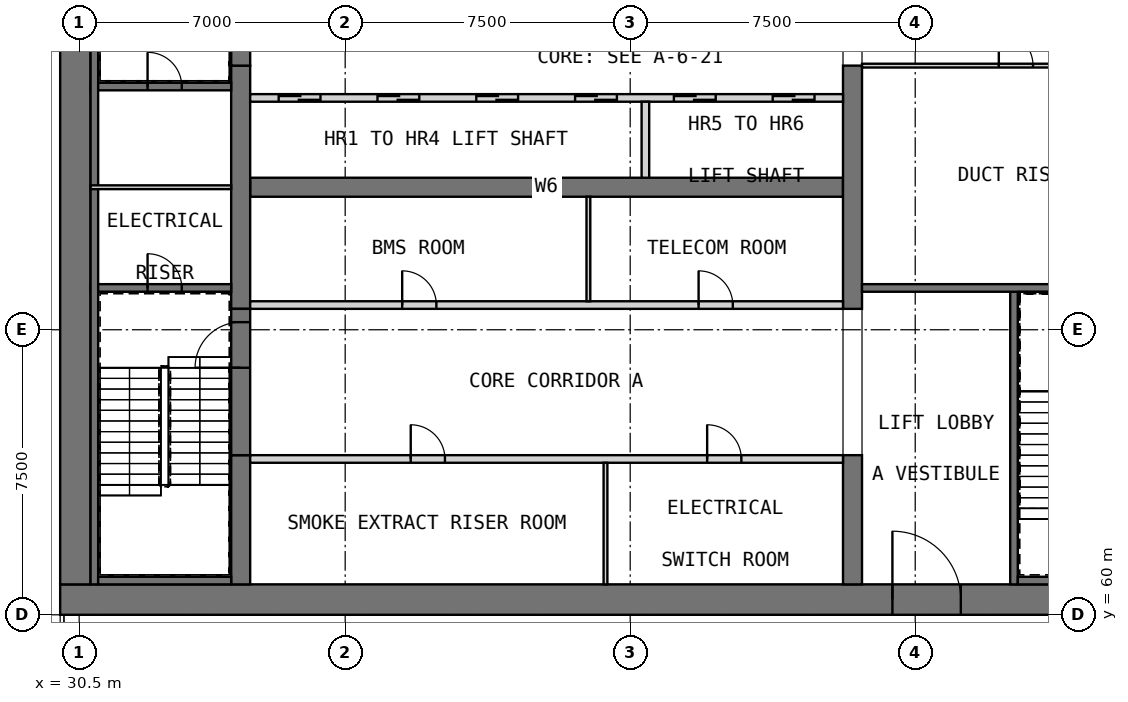
"""IFC4 building model, lengths in metres.
Left out: names, types, materials, properties, quantities, classifications, styles, units other than length and angle.
Written with IfcOpenShell. Run it as: python <this file> out.ifc"""

import sys

from ifc_helpers import new_model, si_unit, direction, frame, frame_2d, origin, place, context, subcontext, project, spatial, rectangle, extrude, element, fill, save


model = new_model("IFC4")
c1 = context("Model", 3, precision=1e-05, world=origin(), true_north=direction((0.0, 1.0)))
c2 = subcontext(c1, "Body", "Model", "MODEL_VIEW")
j1 = project(units=[si_unit("LENGTHUNIT", "METRE"), si_unit("PLANEANGLEUNIT", "RADIAN")], contexts=[c1])
p1 = place(None, origin())
s1 = spatial("IfcSite", under=j1, at=p1, CompositionType="ELEMENT")
p2 = place(p1, origin())
s2 = spatial("IfcBuilding", under=s1, at=p2, CompositionType="ELEMENT")
p3 = place(p2, frame((0.0, 0.0, 166.2)))
s3 = spatial("IfcBuildingStorey", under=s2, at=p3, CompositionType="ELEMENT", Elevation=166.2)
p4 = place(p3, frame((30.0, 60.4, 0.0), z_axis=(0.0, 0.0, 1.0), x_axis=(1.0, 0.0, 0.0)))
e1 = element("IfcWall", 1, at=p4, inside=s3, PredefinedType="SHEAR", context=c2, shape_type="SweptSolid", body=[
    extrude(rectangle(XDim=30.0, YDim=0.8, at=frame_2d((15.0, 0.0))), origin(), (0.0, 0.0, 1.0), 8.0),
])
p5 = place(p4, frame((21.9, 0.0, 0.0)))
e2 = element("IfcOpeningElement", 2, at=p5, cuts=e1, PredefinedType="OPENING", context=c2, shape_type="SweptSolid", body=[
    extrude(rectangle(XDim=1.8, YDim=2.1, at=frame_2d((0.9, 1.05))), frame((0.0, 0.41, 0.0), z_axis=(0.0, -1.0, 0.0), x_axis=(1.0, 0.0, 0.0)), (0.0, 0.0, 1.0), 0.82),
])
p6 = place(p4, frame((26.5, 0.0, 0.0)))
e3 = element("IfcOpeningElement", 3, at=p6, cuts=e1, PredefinedType="OPENING", context=c2, shape_type="SweptSolid", body=[
    extrude(rectangle(XDim=1.2, YDim=2.1, at=frame_2d((0.6, 1.05))), frame((0.0, 0.41, 0.0), z_axis=(0.0, -1.0, 0.0), x_axis=(1.0, 0.0, 0.0)), (0.0, 0.0, 1.0), 0.82),
])
p7 = place(p3, frame((30.4, 60.8, 0.0), z_axis=(0.0, 0.0, 1.0), x_axis=(0.0, 1.0, 0.0)))
e4 = element("IfcWall", 4, at=p7, inside=s3, PredefinedType="SHEAR", context=c2, shape_type="SweptSolid", body=[
    extrude(rectangle(XDim=20.9, YDim=0.8, at=frame_2d((10.45, 0.0))), origin(), (0.0, 0.0, 1.0), 8.0),
])
p8 = place(p3, frame((35.0, 71.25, 0.0), z_axis=(0.0, 0.0, 1.0), x_axis=(1.0, 0.0, 0.0)))
e5 = element("IfcWall", 5, at=p8, inside=s3, PredefinedType="SHEAR", context=c2, shape_type="SweptSolid", body=[
    extrude(rectangle(XDim=15.6, YDim=0.5, at=frame_2d((7.8, 0.0))), origin(), (0.0, 0.0, 1.0), 8.0),
])
p9 = place(p3, frame((34.75, 60.8, 0.0), z_axis=(0.0, 0.0, 1.0), x_axis=(0.0, 1.0, 0.0)))
e6 = element("IfcWall", 6, at=p9, inside=s3, PredefinedType="SHEAR", context=c2, shape_type="SweptSolid", body=[
    extrude(rectangle(XDim=3.4, YDim=0.5, at=frame_2d((1.7, 0.0))), origin(), (0.0, 0.0, 1.0), 8.0),
])
p10 = place(p3, frame((34.75, 68.05, 0.0), z_axis=(0.0, 0.0, 1.0), x_axis=(0.0, 1.0, 0.0)))
e7 = element("IfcWall", 7, at=p10, inside=s3, PredefinedType="SHEAR", context=c2, shape_type="SweptSolid", body=[
    extrude(rectangle(XDim=6.4, YDim=0.5, at=frame_2d((3.2, 0.0))), origin(), (0.0, 0.0, 1.0), 8.0),
])
p11 = place(p3, frame((50.85, 60.8, 0.0), z_axis=(0.0, 0.0, 1.0), x_axis=(0.0, 1.0, 0.0)))
e8 = element("IfcWall", 8, at=p11, inside=s3, PredefinedType="SHEAR", context=c2, shape_type="SweptSolid", body=[
    extrude(rectangle(XDim=3.4, YDim=0.5, at=frame_2d((1.7, 0.0))), origin(), (0.0, 0.0, 1.0), 8.0),
])
p12 = place(p3, frame((50.85, 68.05, 0.0), z_axis=(0.0, 0.0, 1.0), x_axis=(0.0, 1.0, 0.0)))
e9 = element("IfcWall", 9, at=p12, inside=s3, PredefinedType="SHEAR", context=c2, shape_type="SweptSolid", body=[
    extrude(rectangle(XDim=6.4, YDim=0.5, at=frame_2d((3.2, 0.0))), origin(), (0.0, 0.0, 1.0), 8.0),
])
p13 = place(p2, frame((0.0, 0.0, 34.0)))
s4 = spatial("IfcBuildingStorey", under=s2, at=p13, CompositionType="ELEMENT", Elevation=34.0)
for number, where, z_axis, x_axis in (
    (10, (29.7, 61.05, 0.0), (0.0, 0.0, 1.0), (0.0, 1.0, 0.0)),
    (11, (29.7, 65.925, 0.0), (0.0, 0.0, 1.0), (0.0, 1.0, 0.0)),
    (12, (29.7, 70.8, 0.0), (0.0, 0.0, 1.0), (0.0, 1.0, 0.0)),
):
    element("IfcWall", number, at=place(p13, frame(where, z_axis=z_axis, x_axis=x_axis)), inside=s4, PredefinedType="SOLIDWALL", context=c2, shape_type="SweptSolid", body=[
        extrude(rectangle(XDim=0.9, YDim=0.6, at=frame_2d((0.45, 0.0))), origin(), (0.0, 0.0, 1.0), 286.2),
    ])
p14 = place(p3, frame((35.0, 64.1, 0.0), z_axis=(0.0, 0.0, 1.0), x_axis=(1.0, 0.0, 0.0)))
e13 = element("IfcWall", 13, at=p14, inside=s3, PredefinedType="PARTITIONING", context=c2, shape_type="SweptSolid", body=[
    extrude(rectangle(XDim=15.6, YDim=0.2, at=frame_2d((7.8, 0.0))), origin(), (0.0, 0.0, 1.0), 7.7),
])
p15 = place(p14, frame((4.225, 0.0, 0.0)))
e14 = element("IfcOpeningElement", 14, at=p15, cuts=e13, PredefinedType="OPENING", context=c2, shape_type="SweptSolid", body=[
    extrude(rectangle(XDim=0.9, YDim=2.1, at=frame_2d((0.45, 1.05))), frame((0.0, 0.11, 0.0), z_axis=(0.0, -1.0, 0.0), x_axis=(1.0, 0.0, 0.0)), (0.0, 0.0, 1.0), 0.22),
])
p16 = place(p14, frame((12.025, 0.0, 0.0)))
e15 = element("IfcOpeningElement", 15, at=p16, cuts=e13, PredefinedType="OPENING", context=c2, shape_type="SweptSolid", body=[
    extrude(rectangle(XDim=0.9, YDim=2.1, at=frame_2d((0.45, 1.05))), frame((0.0, 0.11, 0.0), z_axis=(0.0, -1.0, 0.0), x_axis=(1.0, 0.0, 0.0)), (0.0, 0.0, 1.0), 0.22),
])
p17 = place(p3, frame((44.35, 60.8, 0.0), z_axis=(0.0, 0.0, 1.0), x_axis=(0.0, 1.0, 0.0)))
e16 = element("IfcWall", 16, at=p17, inside=s3, PredefinedType="PARTITIONING", context=c2, shape_type="SweptSolid", body=[
    extrude(rectangle(XDim=3.2, YDim=0.1, at=frame_2d((1.6, 0.0))), origin(), (0.0, 0.0, 1.0), 7.7),
])
p18 = place(p3, frame((35.0, 68.15, 0.0), z_axis=(0.0, 0.0, 1.0), x_axis=(1.0, 0.0, 0.0)))
e17 = element("IfcWall", 17, at=p18, inside=s3, PredefinedType="PARTITIONING", context=c2, shape_type="SweptSolid", body=[
    extrude(rectangle(XDim=15.6, YDim=0.2, at=frame_2d((7.8, 0.0))), origin(), (0.0, 0.0, 1.0), 7.7),
])
p19 = place(p18, frame((4.0, 0.0, 0.0)))
e18 = element("IfcOpeningElement", 18, at=p19, cuts=e17, PredefinedType="OPENING", context=c2, shape_type="SweptSolid", body=[
    extrude(rectangle(XDim=0.9, YDim=2.1, at=frame_2d((0.45, 1.05))), frame((0.0, 0.11, 0.0), z_axis=(0.0, -1.0, 0.0), x_axis=(1.0, 0.0, 0.0)), (0.0, 0.0, 1.0), 0.22),
])
p20 = place(p18, frame((11.8, 0.0, 0.0)))
e19 = element("IfcOpeningElement", 19, at=p20, cuts=e17, PredefinedType="OPENING", context=c2, shape_type="SweptSolid", body=[
    extrude(rectangle(XDim=0.9, YDim=2.1, at=frame_2d((0.45, 1.05))), frame((0.0, 0.11, 0.0), z_axis=(0.0, -1.0, 0.0), x_axis=(1.0, 0.0, 0.0)), (0.0, 0.0, 1.0), 0.22),
])
p21 = place(p3, frame((43.9, 68.25, 0.0), z_axis=(0.0, 0.0, 1.0), x_axis=(0.0, 1.0, 0.0)))
e20 = element("IfcWall", 20, at=p21, inside=s3, PredefinedType="PARTITIONING", context=c2, shape_type="SweptSolid", body=[
    extrude(rectangle(XDim=2.75, YDim=0.1, at=frame_2d((1.375, 0.0))), origin(), (0.0, 0.0, 1.0), 7.7),
])
p22 = place(p3, frame((35.0, 73.6, 0.0), z_axis=(0.0, 0.0, 1.0), x_axis=(1.0, 0.0, 0.0)))
e21 = element("IfcWall", 21, at=p22, inside=s3, PredefinedType="SOLIDWALL", context=c2, shape_type="SweptSolid", body=[
    extrude(rectangle(XDim=15.6, YDim=0.2, at=frame_2d((7.8, 0.0))), origin(), (0.0, 0.0, 1.0), 8.0),
])
p23 = place(p22, frame((0.75, 0.0, 0.0)))
e22 = element("IfcOpeningElement", 22, at=p23, cuts=e21, PredefinedType="OPENING", context=c2, shape_type="SweptSolid", body=[
    extrude(rectangle(XDim=1.1, YDim=2.1, at=frame_2d((0.55, 1.05))), frame((0.0, 0.11, 0.0), z_axis=(0.0, -1.0, 0.0), x_axis=(1.0, 0.0, 0.0)), (0.0, 0.0, 1.0), 0.22),
])
p24 = place(p22, frame((3.35, 0.0, 0.0)))
e23 = element("IfcOpeningElement", 23, at=p24, cuts=e21, PredefinedType="OPENING", context=c2, shape_type="SweptSolid", body=[
    extrude(rectangle(XDim=1.1, YDim=2.1, at=frame_2d((0.55, 1.05))), frame((0.0, 0.11, 0.0), z_axis=(0.0, -1.0, 0.0), x_axis=(1.0, 0.0, 0.0)), (0.0, 0.0, 1.0), 0.22),
])
p25 = place(p22, frame((5.95, 0.0, 0.0)))
e24 = element("IfcOpeningElement", 24, at=p25, cuts=e21, PredefinedType="OPENING", context=c2, shape_type="SweptSolid", body=[
    extrude(rectangle(XDim=1.1, YDim=2.1, at=frame_2d((0.55, 1.05))), frame((0.0, 0.11, 0.0), z_axis=(0.0, -1.0, 0.0), x_axis=(1.0, 0.0, 0.0)), (0.0, 0.0, 1.0), 0.22),
])
p26 = place(p22, frame((8.55, 0.0, 0.0)))
e25 = element("IfcOpeningElement", 25, at=p26, cuts=e21, PredefinedType="OPENING", context=c2, shape_type="SweptSolid", body=[
    extrude(rectangle(XDim=1.1, YDim=2.1, at=frame_2d((0.55, 1.05))), frame((0.0, 0.11, 0.0), z_axis=(0.0, -1.0, 0.0), x_axis=(1.0, 0.0, 0.0)), (0.0, 0.0, 1.0), 0.22),
])
p27 = place(p22, frame((11.15, 0.0, 0.0)))
e26 = element("IfcOpeningElement", 26, at=p27, cuts=e21, PredefinedType="OPENING", context=c2, shape_type="SweptSolid", body=[
    extrude(rectangle(XDim=1.1, YDim=2.1, at=frame_2d((0.55, 1.05))), frame((0.0, 0.11, 0.0), z_axis=(0.0, -1.0, 0.0), x_axis=(1.0, 0.0, 0.0)), (0.0, 0.0, 1.0), 0.22),
])
p28 = place(p22, frame((13.75, 0.0, 0.0)))
e27 = element("IfcOpeningElement", 27, at=p28, cuts=e21, PredefinedType="OPENING", context=c2, shape_type="SweptSolid", body=[
    extrude(rectangle(XDim=1.1, YDim=2.1, at=frame_2d((0.55, 1.05))), frame((0.0, 0.11, 0.0), z_axis=(0.0, -1.0, 0.0), x_axis=(1.0, 0.0, 0.0)), (0.0, 0.0, 1.0), 0.22),
])
p29 = place(p3, frame((45.4, 71.5, 0.0), z_axis=(0.0, 0.0, 1.0), x_axis=(0.0, 1.0, 0.0)))
e28 = element("IfcWall", 28, at=p29, inside=s3, PredefinedType="SOLIDWALL", context=c2, shape_type="SweptSolid", body=[
    extrude(rectangle(XDim=2.0, YDim=0.2, at=frame_2d((1.0, 0.0))), origin(), (0.0, 0.0, 1.0), 8.0),
])
p30 = place(p3, frame((34.75, 64.2, 0.0), z_axis=(0.0, 0.0, 1.0), x_axis=(0.0, 1.0, 0.0)))
e29 = element("IfcWall", 29, at=p30, inside=s3, PredefinedType="SOLIDWALL", context=c2, shape_type="SweptSolid", body=[
    extrude(rectangle(XDim=3.85, YDim=0.5, at=frame_2d((1.925, 0.0))), origin(), (0.0, 0.0, 1.0), 6.8),
])
p31 = place(p30, frame((2.3, 0.0, 0.0)))
e30 = element("IfcOpeningElement", 30, at=p31, cuts=e29, PredefinedType="OPENING", context=c2, shape_type="SweptSolid", body=[
    extrude(rectangle(XDim=1.2, YDim=2.1, at=frame_2d((0.6, 1.05))), frame((0.0, 0.26, 0.0), z_axis=(0.0, -1.0, 0.0), x_axis=(1.0, 0.0, 0.0)), (0.0, 0.0, 1.0), 0.52),
])
p32 = place(p3, frame((34.75, 74.45, 0.0), z_axis=(0.0, 0.0, 1.0), x_axis=(0.0, 1.0, 0.0)))
e31 = element("IfcWall", 31, at=p32, inside=s3, PredefinedType="SOLIDWALL", context=c2, shape_type="SweptSolid", body=[
    extrude(rectangle(XDim=3.85, YDim=0.5, at=frame_2d((1.925, 0.0))), origin(), (0.0, 0.0, 1.0), 6.8),
])
p33 = place(p32, frame((1.0, 0.0, 0.0)))
e32 = element("IfcOpeningElement", 32, at=p33, cuts=e31, PredefinedType="OPENING", context=c2, shape_type="SweptSolid", body=[
    extrude(rectangle(XDim=1.2, YDim=2.1, at=frame_2d((0.6, 1.05))), frame((0.0, 0.26, 0.0), z_axis=(0.0, -1.0, 0.0), x_axis=(1.0, 0.0, 0.0)), (0.0, 0.0, 1.0), 0.52),
])
p34 = place(p3, frame((30.8, 68.6, 0.0), z_axis=(0.0, 0.0, 1.0), x_axis=(1.0, 0.0, 0.0)))
e33 = element("IfcWall", 33, at=p34, inside=s3, PredefinedType="SOLIDWALL", context=c2, shape_type="SweptSolid", body=[
    extrude(rectangle(XDim=3.7, YDim=0.2, at=frame_2d((1.85, 0.0))), origin(), (0.0, 0.0, 1.0), 7.7),
])
p35 = place(p34, frame((1.5, 0.0, 0.0)))
e34 = element("IfcOpeningElement", 34, at=p35, cuts=e33, PredefinedType="OPENING", context=c2, shape_type="SweptSolid", body=[
    extrude(rectangle(XDim=0.9, YDim=2.1, at=frame_2d((0.45, 1.05))), frame((0.0, 0.11, 0.0), z_axis=(0.0, -1.0, 0.0), x_axis=(1.0, 0.0, 0.0)), (0.0, 0.0, 1.0), 0.22),
])
p36 = place(p3, frame((30.8, 73.9, 0.0), z_axis=(0.0, 0.0, 1.0), x_axis=(1.0, 0.0, 0.0)))
e35 = element("IfcWall", 35, at=p36, inside=s3, PredefinedType="SOLIDWALL", context=c2, shape_type="SweptSolid", body=[
    extrude(rectangle(XDim=3.7, YDim=0.2, at=frame_2d((1.85, 0.0))), origin(), (0.0, 0.0, 1.0), 7.7),
])
p37 = place(p36, frame((1.5, 0.0, 0.0)))
e36 = element("IfcOpeningElement", 36, at=p37, cuts=e35, PredefinedType="OPENING", context=c2, shape_type="SweptSolid", body=[
    extrude(rectangle(XDim=0.9, YDim=2.1, at=frame_2d((0.45, 1.05))), frame((0.0, 0.11, 0.0), z_axis=(0.0, -1.0, 0.0), x_axis=(1.0, 0.0, 0.0)), (0.0, 0.0, 1.0), 0.22),
])
p38 = place(p3, frame((55.1, 60.8, 0.0), z_axis=(0.0, 0.0, 1.0), x_axis=(0.0, 1.0, 0.0)))
e37 = element("IfcWall", 37, at=p38, inside=s3, PredefinedType="SOLIDWALL", context=c2, shape_type="SweptSolid", body=[
    extrude(rectangle(XDim=7.8, YDim=0.2, at=frame_2d((3.9, 0.0))), origin(), (0.0, 0.0, 1.0), 7.7),
])
p39 = place(p3, frame((51.1, 68.6, 0.0), z_axis=(0.0, 0.0, 1.0), x_axis=(1.0, 0.0, 0.0)))
e38 = element("IfcWall", 38, at=p39, inside=s3, PredefinedType="SOLIDWALL", context=c2, shape_type="SweptSolid", body=[
    extrude(rectangle(XDim=8.1, YDim=0.2, at=frame_2d((4.05, 0.0))), origin(), (0.0, 0.0, 1.0), 7.7),
])
p40 = place(p3, frame((30.9, 60.8, 0.0), z_axis=(0.0, 0.0, 1.0), x_axis=(0.0, 1.0, 0.0)))
e39 = element("IfcWall", 39, at=p40, inside=s3, PredefinedType="SOLIDWALL", context=c2, shape_type="SweptSolid", body=[
    extrude(rectangle(XDim=20.9, YDim=0.2, at=frame_2d((10.45, 0.0))), origin(), (0.0, 0.0, 1.0), 7.7),
])
p41 = place(p3, frame((31.0, 60.9, 0.0), z_axis=(0.0, 0.0, 1.0), x_axis=(1.0, 0.0, 0.0)))
e40 = element("IfcWall", 40, at=p41, inside=s3, PredefinedType="SOLIDWALL", context=c2, shape_type="SweptSolid", body=[
    extrude(rectangle(XDim=3.5, YDim=0.2, at=frame_2d((1.75, 0.0))), origin(), (0.0, 0.0, 1.0), 7.7),
])
p42 = place(p3, frame((55.2, 60.9, 0.0), z_axis=(0.0, 0.0, 1.0), x_axis=(1.0, 0.0, 0.0)))
e41 = element("IfcWall", 41, at=p42, inside=s3, PredefinedType="SOLIDWALL", context=c2, shape_type="SweptSolid", body=[
    extrude(rectangle(XDim=1.3, YDim=0.2, at=frame_2d((0.65, 0.0))), origin(), (0.0, 0.0, 1.0), 7.7),
])
p43 = place(p3, frame((30.8, 71.25, 0.0), z_axis=(0.0, 0.0, 1.0), x_axis=(1.0, 0.0, 0.0)))
e42 = element("IfcWall", 42, at=p43, inside=s3, PredefinedType="PARTITIONING", context=c2, shape_type="SweptSolid", body=[
    extrude(rectangle(XDim=3.7, YDim=0.1, at=frame_2d((1.85, 0.0))), origin(), (0.0, 0.0, 1.0), 7.7),
])
p44 = place(p3, frame((51.1, 74.45, 0.0), z_axis=(0.0, 0.0, 1.0), x_axis=(1.0, 0.0, 0.0)))
e43 = element("IfcWall", 43, at=p44, inside=s3, PredefinedType="PARTITIONING", context=c2, shape_type="SweptSolid", body=[
    extrude(rectangle(XDim=8.1, YDim=0.1, at=frame_2d((4.05, 0.0))), origin(), (0.0, 0.0, 1.0), 7.7),
])
p45 = place(p44, frame((3.6, 0.0, 0.0)))
e44 = element("IfcOpeningElement", 44, at=p45, cuts=e43, PredefinedType="OPENING", context=c2, shape_type="SweptSolid", body=[
    extrude(rectangle(XDim=0.9, YDim=2.1, at=frame_2d((0.45, 1.05))), frame((0.0, 0.06, 0.0), z_axis=(0.0, -1.0, 0.0), x_axis=(1.0, 0.0, 0.0)), (0.0, 0.0, 1.0), 0.12),
])
p46 = place(p15, origin())
e45 = element("IfcDoor", 45, at=p46, inside=s3, OperationType="SINGLE_SWING_LEFT", PredefinedType="DOOR", context=c2, shape_type="SweptSolid", body=[
    extrude(rectangle(XDim=0.9, YDim=2.1, at=frame_2d((0.45, 1.05))), frame((0.0, 0.025, 0.0), z_axis=(0.0, -1.0, 0.0), x_axis=(1.0, 0.0, 0.0)), (0.0, 0.0, 1.0), 0.05),
])
fill(e14, e45)
p47 = place(p16, origin())
e46 = element("IfcDoor", 46, at=p47, inside=s3, OperationType="SINGLE_SWING_RIGHT", PredefinedType="DOOR", context=c2, shape_type="SweptSolid", body=[
    extrude(rectangle(XDim=0.9, YDim=2.1, at=frame_2d((0.45, 1.05))), frame((0.0, 0.025, 0.0), z_axis=(0.0, -1.0, 0.0), x_axis=(1.0, 0.0, 0.0)), (0.0, 0.0, 1.0), 0.05),
])
fill(e15, e46)
p48 = place(p19, origin())
e47 = element("IfcDoor", 47, at=p48, inside=s3, OperationType="SINGLE_SWING_LEFT", PredefinedType="DOOR", context=c2, shape_type="SweptSolid", body=[
    extrude(rectangle(XDim=0.9, YDim=2.1, at=frame_2d((0.45, 1.05))), frame((0.0, 0.025, 0.0), z_axis=(0.0, -1.0, 0.0), x_axis=(1.0, 0.0, 0.0)), (0.0, 0.0, 1.0), 0.05),
])
fill(e18, e47)
p49 = place(p20, origin())
e48 = element("IfcDoor", 48, at=p49, inside=s3, OperationType="SINGLE_SWING_RIGHT", PredefinedType="DOOR", context=c2, shape_type="SweptSolid", body=[
    extrude(rectangle(XDim=0.9, YDim=2.1, at=frame_2d((0.45, 1.05))), frame((0.0, 0.025, 0.0), z_axis=(0.0, -1.0, 0.0), x_axis=(1.0, 0.0, 0.0)), (0.0, 0.0, 1.0), 0.05),
])
fill(e19, e48)
p50 = place(p23, origin())
e49 = element("IfcDoor", 49, at=p50, inside=s3, OperationType="DOUBLE_DOOR_SLIDING", PredefinedType="DOOR", context=c2, shape_type="SweptSolid", body=[
    extrude(rectangle(XDim=1.1, YDim=2.1, at=frame_2d((0.55, 1.05))), frame((0.0, 0.025, 0.0), z_axis=(0.0, -1.0, 0.0), x_axis=(1.0, 0.0, 0.0)), (0.0, 0.0, 1.0), 0.05),
])
fill(e22, e49)
p51 = place(p24, origin())
e50 = element("IfcDoor", 50, at=p51, inside=s3, OperationType="DOUBLE_DOOR_SLIDING", PredefinedType="DOOR", context=c2, shape_type="SweptSolid", body=[
    extrude(rectangle(XDim=1.1, YDim=2.1, at=frame_2d((0.55, 1.05))), frame((0.0, 0.025, 0.0), z_axis=(0.0, -1.0, 0.0), x_axis=(1.0, 0.0, 0.0)), (0.0, 0.0, 1.0), 0.05),
])
fill(e23, e50)
p52 = place(p25, origin())
e51 = element("IfcDoor", 51, at=p52, inside=s3, OperationType="DOUBLE_DOOR_SLIDING", PredefinedType="DOOR", context=c2, shape_type="SweptSolid", body=[
    extrude(rectangle(XDim=1.1, YDim=2.1, at=frame_2d((0.55, 1.05))), frame((0.0, 0.025, 0.0), z_axis=(0.0, -1.0, 0.0), x_axis=(1.0, 0.0, 0.0)), (0.0, 0.0, 1.0), 0.05),
])
fill(e24, e51)
p53 = place(p26, origin())
e52 = element("IfcDoor", 52, at=p53, inside=s3, OperationType="DOUBLE_DOOR_SLIDING", PredefinedType="DOOR", context=c2, shape_type="SweptSolid", body=[
    extrude(rectangle(XDim=1.1, YDim=2.1, at=frame_2d((0.55, 1.05))), frame((0.0, 0.025, 0.0), z_axis=(0.0, -1.0, 0.0), x_axis=(1.0, 0.0, 0.0)), (0.0, 0.0, 1.0), 0.05),
])
fill(e25, e52)
p54 = place(p27, origin())
e53 = element("IfcDoor", 53, at=p54, inside=s3, OperationType="DOUBLE_DOOR_SLIDING", PredefinedType="DOOR", context=c2, shape_type="SweptSolid", body=[
    extrude(rectangle(XDim=1.1, YDim=2.1, at=frame_2d((0.55, 1.05))), frame((0.0, 0.025, 0.0), z_axis=(0.0, -1.0, 0.0), x_axis=(1.0, 0.0, 0.0)), (0.0, 0.0, 1.0), 0.05),
])
fill(e26, e53)
p55 = place(p28, origin())
e54 = element("IfcDoor", 54, at=p55, inside=s3, OperationType="DOUBLE_DOOR_SLIDING", PredefinedType="DOOR", context=c2, shape_type="SweptSolid", body=[
    extrude(rectangle(XDim=1.1, YDim=2.1, at=frame_2d((0.55, 1.05))), frame((0.0, 0.025, 0.0), z_axis=(0.0, -1.0, 0.0), x_axis=(1.0, 0.0, 0.0)), (0.0, 0.0, 1.0), 0.05),
])
fill(e27, e54)
p56 = place(p5, origin())
e55 = element("IfcDoor", 55, at=p56, inside=s3, OperationType="DOUBLE_DOOR_SINGLE_SWING", PredefinedType="DOOR", context=c2, shape_type="SweptSolid", body=[
    extrude(rectangle(XDim=1.8, YDim=2.1, at=frame_2d((0.9, 1.05))), frame((0.0, 0.025, 0.0), z_axis=(0.0, -1.0, 0.0), x_axis=(1.0, 0.0, 0.0)), (0.0, 0.0, 1.0), 0.05),
])
fill(e2, e55)
p57 = place(p31, origin())
e56 = element("IfcDoor", 56, at=p57, inside=s3, OperationType="SINGLE_SWING_LEFT", PredefinedType="DOOR", context=c2, shape_type="SweptSolid", body=[
    extrude(rectangle(XDim=1.2, YDim=2.1, at=frame_2d((0.6, 1.05))), frame((0.0, 0.025, 0.0), z_axis=(0.0, -1.0, 0.0), x_axis=(1.0, 0.0, 0.0)), (0.0, 0.0, 1.0), 0.05),
])
fill(e30, e56)
p58 = place(p35, origin())
e57 = element("IfcDoor", 57, at=p58, inside=s3, OperationType="SINGLE_SWING_LEFT", PredefinedType="DOOR", context=c2, shape_type="SweptSolid", body=[
    extrude(rectangle(XDim=0.9, YDim=2.1, at=frame_2d((0.45, 1.05))), frame((0.0, 0.025, 0.0), z_axis=(0.0, -1.0, 0.0), x_axis=(1.0, 0.0, 0.0)), (0.0, 0.0, 1.0), 0.05),
])
fill(e34, e57)
p59 = place(p37, origin())
e58 = element("IfcDoor", 58, at=p59, inside=s3, OperationType="SINGLE_SWING_RIGHT", PredefinedType="DOOR", context=c2, shape_type="SweptSolid", body=[
    extrude(rectangle(XDim=0.9, YDim=2.1, at=frame_2d((0.45, 1.05))), frame((0.0, 0.025, 0.0), z_axis=(0.0, -1.0, 0.0), x_axis=(1.0, 0.0, 0.0)), (0.0, 0.0, 1.0), 0.05),
])
fill(e36, e58)
p60 = place(p45, origin())
e59 = element("IfcDoor", 59, at=p60, inside=s3, OperationType="SINGLE_SWING_LEFT", PredefinedType="DOOR", context=c2, shape_type="SweptSolid", body=[
    extrude(rectangle(XDim=0.9, YDim=2.1, at=frame_2d((0.45, 1.05))), frame((0.0, 0.025, 0.0), z_axis=(0.0, -1.0, 0.0), x_axis=(1.0, 0.0, 0.0)), (0.0, 0.0, 1.0), 0.05),
])
fill(e44, e59)
save(model, sys.argv[1])
